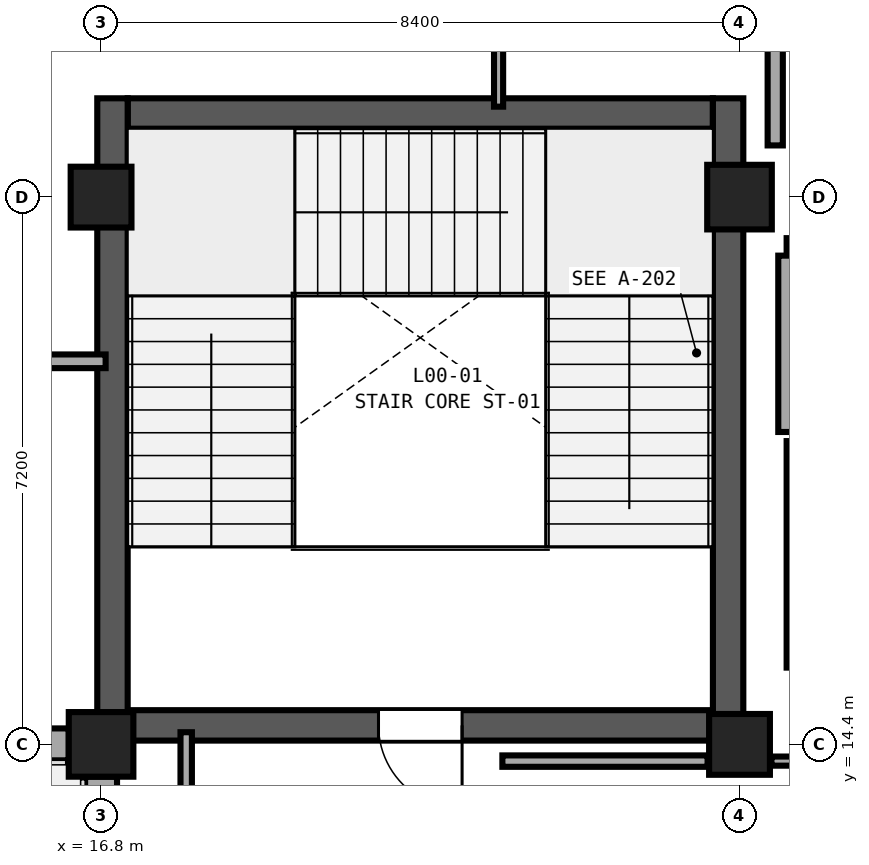
"""IFC4 building model, lengths in metres.
Left out: names, types, materials, properties, quantities, classifications, styles, units other than length and angle.
Written with IfcOpenShell. Run it as: python <this file> out.ifc"""

import sys

from ifc_helpers import new_model, si_unit, direction, frame, frame_2d, origin, origin_2d, place, context, subcontext, project, spatial, rectangle, extrude, element, fill, save


model = new_model("IFC4")
c1 = context("Model", 3, precision=1e-05, world=origin(), true_north=direction((0.0, 1.0)))
c2 = subcontext(c1, "Body", "Model", "MODEL_VIEW")
j1 = project(units=[si_unit("LENGTHUNIT", "METRE"), si_unit("PLANEANGLEUNIT", "RADIAN")], contexts=[c1])
p1 = place(None, origin())
s1 = spatial("IfcSite", under=j1, at=p1, CompositionType="ELEMENT")
p2 = place(p1, origin())
s2 = spatial("IfcBuilding", under=s1, at=p2, CompositionType="ELEMENT")
p3 = place(p2, origin())
s3 = spatial("IfcBuildingStorey", under=s2, at=p3, CompositionType="ELEMENT", Elevation=0.0)
p4 = place(p3, frame((16.8, 14.4, 0.0), z_axis=(0.0, 0.0, 1.0), x_axis=(1.0, 0.0, 0.0)))
e1 = element("IfcColumn", 1, at=p4, inside=s3, PredefinedType="COLUMN", context=c2, shape_type="SweptSolid", body=[
    extrude(rectangle(XDim=0.85, YDim=0.85, at=origin_2d()), origin(), (0.0, 0.0, 1.0), 5.4),
])
for number, where, z_axis, x_axis in (
    (2, (16.8, 21.6, 0.0), (0.0, 0.0, 1.0), (1.0, 0.0, 0.0)),
    (3, (25.2, 14.4, 0.0), (0.0, 0.0, 1.0), (1.0, 0.0, 0.0)),
):
    element("IfcColumn", number, at=place(p3, frame(where, z_axis=z_axis, x_axis=x_axis)), inside=s3, PredefinedType="COLUMN", context=c2, shape_type="SweptSolid", body=[
        extrude(rectangle(XDim=0.8, YDim=0.8, at=origin_2d()), origin(), (0.0, 0.0, 1.0), 5.4),
    ])
p5 = place(p3, frame((25.2, 21.6, 0.0), z_axis=(0.0, 0.0, 1.0), x_axis=(1.0, 0.0, 0.0)))
e4 = element("IfcColumn", 4, at=p5, inside=s3, PredefinedType="COLUMN", context=c2, shape_type="SweptSolid", body=[
    extrude(rectangle(XDim=0.85, YDim=0.85, at=origin_2d()), origin(), (0.0, 0.0, 1.0), 5.4),
])
p6 = place(p3, frame((16.375, 14.4, 0.0), z_axis=(0.0, 0.0, 1.0), x_axis=(-1.0, 0.0, 0.0)))
e5 = element("IfcWall", 5, at=p6, inside=s3, PredefinedType="SOLIDWALL", context=c2, shape_type="SweptSolid", body=[
    extrude(rectangle(XDim=7.575, YDim=0.42, at=frame_2d((3.788, 0.0))), origin(), (0.0, 0.0, 1.0), 4.53),
])
p7 = place(p6, frame((2.738, 0.0, 0.0)))
e6 = element("IfcOpeningElement", 6, at=p7, cuts=e5, PredefinedType="OPENING", context=c2, shape_type="SweptSolid", body=[
    extrude(rectangle(XDim=2.1, YDim=2.45, at=frame_2d((1.05, 1.225))), frame((0.0, 0.23, 0.0), z_axis=(0.0, -1.0, 0.0), x_axis=(1.0, 0.0, 0.0)), (0.0, 0.0, 1.0), 0.46),
])
p8 = place(p6, frame((0.28, 0.0, 0.65)))
e7 = element("IfcOpeningElement", 7, at=p8, cuts=e5, PredefinedType="OPENING", context=c2, shape_type="SweptSolid", body=[
    extrude(rectangle(XDim=1.4, YDim=2.68, at=frame_2d((0.7, 1.34))), frame((0.0, 0.23, 0.0), z_axis=(0.0, -1.0, 0.0), x_axis=(1.0, 0.0, 0.0)), (0.0, 0.0, 1.0), 0.46),
])
p9 = place(p6, frame((5.895, 0.0, 0.65)))
e8 = element("IfcOpeningElement", 8, at=p9, cuts=e5, PredefinedType="OPENING", context=c2, shape_type="SweptSolid", body=[
    extrude(rectangle(XDim=1.4, YDim=2.68, at=frame_2d((0.7, 1.34))), frame((0.0, 0.23, 0.0), z_axis=(0.0, -1.0, 0.0), x_axis=(1.0, 0.0, 0.0)), (0.0, 0.0, 1.0), 0.46),
])
p10 = place(p3, frame((16.8, 7.6, 0.0), z_axis=(0.0, 0.0, 1.0), x_axis=(0.0, 1.0, 0.0)))
e9 = element("IfcWall", 9, at=p10, inside=s3, PredefinedType="SOLIDWALL", context=c2, shape_type="SweptSolid", body=[
    extrude(rectangle(XDim=6.375, YDim=0.42, at=frame_2d((3.188, 0.0))), origin(), (0.0, 0.0, 1.0), 4.53),
])
p11 = place(p10, frame((1.988, 0.0, 0.0)))
e10 = element("IfcOpeningElement", 10, at=p11, cuts=e9, PredefinedType="OPENING", context=c2, shape_type="SweptSolid", body=[
    extrude(rectangle(XDim=2.4, YDim=2.6, at=frame_2d((1.2, 1.3))), frame((0.0, 0.23, 0.0), z_axis=(0.0, -1.0, 0.0), x_axis=(1.0, 0.0, 0.0)), (0.0, 0.0, 1.0), 0.46),
])
p12 = place(p10, frame((0.28, 0.0, 0.65)))
e11 = element("IfcOpeningElement", 11, at=p12, cuts=e9, PredefinedType="OPENING", context=c2, shape_type="SweptSolid", body=[
    extrude(rectangle(XDim=1.19, YDim=2.68, at=frame_2d((0.595, 1.34))), frame((0.0, 0.23, 0.0), z_axis=(0.0, -1.0, 0.0), x_axis=(1.0, 0.0, 0.0)), (0.0, 0.0, 1.0), 0.46),
])
p13 = place(p10, frame((4.905, 0.0, 0.65)))
e12 = element("IfcOpeningElement", 12, at=p13, cuts=e9, PredefinedType="OPENING", context=c2, shape_type="SweptSolid", body=[
    extrude(rectangle(XDim=1.19, YDim=2.68, at=frame_2d((0.595, 1.34))), frame((0.0, 0.23, 0.0), z_axis=(0.0, -1.0, 0.0), x_axis=(1.0, 0.0, 0.0)), (0.0, 0.0, 1.0), 0.46),
])
p14 = place(p3, frame((24.85, 14.65, 0.0), z_axis=(0.0, 0.0, 1.0), x_axis=(-1.0, 0.0, 0.0)))
e13 = element("IfcWall", 13, at=p14, inside=s3, PredefinedType="SHEAR", context=c2, shape_type="SweptSolid", body=[
    extrude(rectangle(XDim=7.7, YDim=0.4, at=frame_2d((3.85, 0.0))), origin(), (0.0, 0.0, 1.0), 5.4),
])
p15 = place(p14, frame((3.3, 0.0, 0.0)))
e14 = element("IfcOpeningElement", 14, at=p15, cuts=e13, PredefinedType="OPENING", context=c2, shape_type="SweptSolid", body=[
    extrude(rectangle(XDim=1.1, YDim=2.2, at=frame_2d((0.55, 1.1))), frame((0.0, 0.22, 0.0), z_axis=(0.0, -1.0, 0.0), x_axis=(1.0, 0.0, 0.0)), (0.0, 0.0, 1.0), 0.44),
])
p16 = place(p3, frame((17.15, 22.7, 0.0), z_axis=(0.0, 0.0, 1.0), x_axis=(1.0, 0.0, 0.0)))
e15 = element("IfcWall", 15, at=p16, inside=s3, PredefinedType="SHEAR", context=c2, shape_type="SweptSolid", body=[
    extrude(rectangle(XDim=7.7, YDim=0.4, at=frame_2d((3.85, 0.0))), origin(), (0.0, 0.0, 1.0), 5.4),
])
for number, where, z_axis, x_axis in (
    (16, (16.95, 22.9, 0.0), (0.0, 0.0, 1.0), (0.0, -1.0, 0.0)),
    (17, (25.05, 14.45, 0.0), (0.0, 0.0, 1.0), (0.0, 1.0, 0.0)),
):
    element("IfcWall", number, at=place(p3, frame(where, z_axis=z_axis, x_axis=x_axis)), inside=s3, PredefinedType="SHEAR", context=c2, shape_type="SweptSolid", body=[
        extrude(rectangle(XDim=8.45, YDim=0.4, at=frame_2d((4.225, 0.0))), origin(), (0.0, 0.0, 1.0), 5.4),
    ])
p17 = place(p3, frame((25.94, 18.39, 0.0), z_axis=(0.0, 0.0, 1.0), x_axis=(0.0, -1.0, 0.0)))
e18 = element("IfcWall", 18, at=p17, inside=s3, PredefinedType="SHEAR", context=c2, shape_type="SweptSolid", body=[
    extrude(rectangle(XDim=2.98, YDim=0.24, at=frame_2d((1.49, 0.0))), origin(), (0.0, 0.0, 1.0), 5.08),
])
p18 = place(p3, frame((25.82, 20.95, 0.0), z_axis=(0.0, 0.0, 1.0), x_axis=(1.0, 0.0, 0.0)))
e19 = element("IfcWall", 19, at=p18, inside=s3, PredefinedType="SOLIDWALL", context=c2, shape_type="SweptSolid", body=[
    extrude(rectangle(XDim=2.54, YDim=0.22, at=frame_2d((1.27, 0.0))), origin(), (0.0, 0.0, 1.0), 4.58),
])
p19 = place(p18, frame((0.745, 0.0, 0.0)))
e20 = element("IfcOpeningElement", 20, at=p19, cuts=e19, PredefinedType="OPENING", context=c2, shape_type="SweptSolid", body=[
    extrude(rectangle(XDim=1.05, YDim=2.15, at=frame_2d((0.525, 1.075))), frame((0.0, 0.13, 0.0), z_axis=(0.0, -1.0, 0.0), x_axis=(1.0, 0.0, 0.0)), (0.0, 0.0, 1.0), 0.26),
])
p20 = place(p3, frame((25.82, 18.51, 0.0), z_axis=(0.0, 0.0, 1.0), x_axis=(0.0, 1.0, 0.0)))
e21 = element("IfcWall", 21, at=p20, inside=s3, PredefinedType="SOLIDWALL", context=c2, shape_type="SweptSolid", body=[
    extrude(rectangle(XDim=2.32, YDim=0.22, at=frame_2d((1.16, 0.0))), origin(), (0.0, 0.0, 1.0), 5.08),
])
p21 = place(p3, frame((22.08, 14.18, 0.0), z_axis=(0.0, 0.0, 1.0), x_axis=(1.0, 0.0, 0.0)))
e22 = element("IfcWall", 22, at=p21, inside=s3, PredefinedType="PARTITIONING", context=c2, shape_type="SweptSolid", body=[
    extrude(rectangle(XDim=2.7, YDim=0.15, at=frame_2d((1.35, 0.0))), origin(), (0.0, 0.0, 1.0), 4.58),
])
p22 = place(p3, frame((25.62, 14.18, 0.0), z_axis=(0.0, 0.0, 1.0), x_axis=(1.0, 0.0, 0.0)))
e23 = element("IfcWall", 23, at=p22, inside=s3, PredefinedType="PARTITIONING", context=c2, shape_type="SweptSolid", body=[
    extrude(rectangle(XDim=7.535, YDim=0.12, at=frame_2d((3.768, 0.0))), origin(), (0.0, 0.0, 1.0), 4.58),
])
p23 = place(p22, frame((3.248, 0.0, 0.0)))
e24 = element("IfcOpeningElement", 24, at=p23, cuts=e23, PredefinedType="OPENING", context=c2, shape_type="SweptSolid", body=[
    extrude(rectangle(XDim=1.04, YDim=2.37, at=frame_2d((0.52, 1.185))), frame((0.0, 0.08, 0.0), z_axis=(0.0, -1.0, 0.0), x_axis=(1.0, 0.0, 0.0)), (0.0, 0.0, 1.0), 0.16),
])
p24 = place(p3, frame((17.92, 11.857, 0.0), z_axis=(0.0, 0.0, 1.0), x_axis=(0.0, 1.0, 0.0)))
e25 = element("IfcWall", 25, at=p24, inside=s3, PredefinedType="PARTITIONING", context=c2, shape_type="SweptSolid", body=[
    extrude(rectangle(XDim=2.703, YDim=0.15, at=frame_2d((1.352, 0.0))), origin(), (0.0, 0.0, 1.0), 5.08),
])
p25 = place(p3, frame((22.03, 22.79, 0.0), z_axis=(0.0, 0.0, 1.0), x_axis=(0.0, 1.0, 0.0)))
e26 = element("IfcWall", 26, at=p25, inside=s3, PredefinedType="PARTITIONING", context=c2, shape_type="SweptSolid", body=[
    extrude(rectangle(XDim=2.23, YDim=0.12, at=frame_2d((1.115, 0.0))), origin(), (0.0, 0.0, 1.0), 5.08),
])
p26 = place(p3, frame((0.37, 19.44, 0.0), z_axis=(0.0, 0.0, 1.0), x_axis=(1.0, 0.0, 0.0)))
e27 = element("IfcWall", 27, at=p26, inside=s3, PredefinedType="PARTITIONING", context=c2, shape_type="SweptSolid", body=[
    extrude(rectangle(XDim=16.49, YDim=0.18, at=frame_2d((8.245, 0.0))), origin(), (0.0, 0.0, 1.0), 5.08),
])
p27 = place(p26, frame((8.59, 0.0, 0.0)))
e28 = element("IfcOpeningElement", 28, at=p27, cuts=e27, PredefinedType="OPENING", context=c2, shape_type="SweptSolid", body=[
    extrude(rectangle(XDim=1.68, YDim=2.29, at=frame_2d((0.84, 1.145))), frame((0.0, 0.11, 0.0), z_axis=(0.0, -1.0, 0.0), x_axis=(1.0, 0.0, 0.0)), (0.0, 0.0, 1.0), 0.22),
])
p28 = place(p3, frame((25.67, 22.28, 0.0), z_axis=(0.0, 0.0, 1.0), x_axis=(0.0, 1.0, 0.0)))
e29 = element("IfcWall", 29, at=p28, inside=s3, PredefinedType="PLUMBINGWALL", context=c2, shape_type="SweptSolid", body=[
    extrude(rectangle(XDim=2.59, YDim=0.2, at=frame_2d((1.295, 0.0))), origin(), (0.0, 0.0, 1.0), 5.08),
])
p29 = place(p15, origin())
e30 = element("IfcDoor", 30, at=p29, inside=s3, OperationType="SINGLE_SWING_LEFT", PredefinedType="DOOR", context=c2, shape_type="SweptSolid", body=[
    extrude(rectangle(XDim=1.1, YDim=2.2, at=frame_2d((0.55, 1.1))), frame((0.0, 0.025, 0.0), z_axis=(0.0, -1.0, 0.0), x_axis=(1.0, 0.0, 0.0)), (0.0, 0.0, 1.0), 0.05),
])
fill(e14, e30)
save(model, sys.argv[1])
